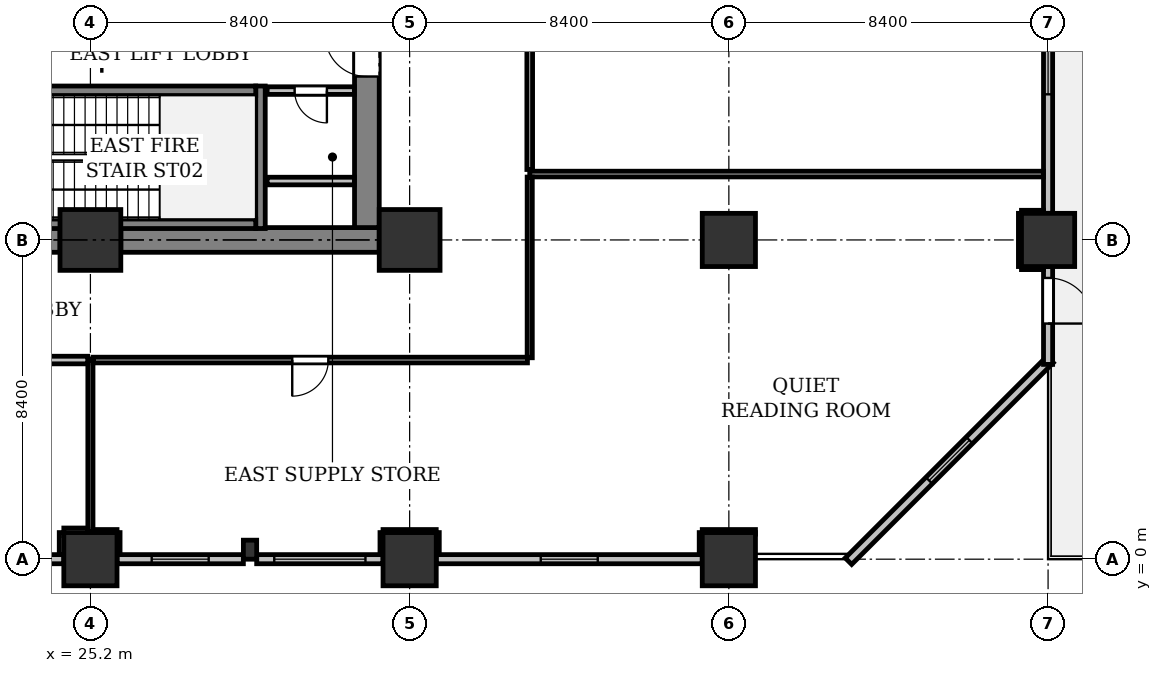
"""IFC4 building model, lengths in metres.
Left out: names, types, materials, properties, quantities, classifications, styles, units other than length and angle.
Written with IfcOpenShell. Run it as: python <this file> out.ifc"""

import sys

from ifc_helpers import new_model, si_unit, direction, frame, frame_2d, origin, origin_2d, place, context, subcontext, project, spatial, rectangle, extrude, element, fill, save


model = new_model("IFC4")
c1 = context("Model", 3, precision=1e-05, world=origin(), true_north=direction((0.0, 1.0)))
c2 = subcontext(c1, "Body", "Model", "MODEL_VIEW")
j1 = project(units=[si_unit("LENGTHUNIT", "METRE"), si_unit("PLANEANGLEUNIT", "RADIAN")], contexts=[c1])
p1 = place(None, origin())
s1 = spatial("IfcSite", under=j1, at=p1, CompositionType="ELEMENT")
p2 = place(p1, origin())
s2 = spatial("IfcBuilding", under=s1, at=p2, CompositionType="ELEMENT")
p3 = place(p2, frame((0.0, 0.0, 19.8)))
s3 = spatial("IfcBuildingStorey", under=s2, at=p3, CompositionType="ELEMENT", Elevation=19.8)
p4 = place(p3, frame((25.2, 0.0, 0.0), z_axis=(0.0, 0.0, 1.0), x_axis=(1.0, 0.0, 0.0)))
e1 = element("IfcColumn", 1, at=p4, inside=s3, PredefinedType="COLUMN", context=c2, shape_type="SweptSolid", body=[
    extrude(rectangle(XDim=1.4, YDim=1.4, at=origin_2d()), origin(), (0.0, 0.0, 1.0), 5.0),
])
p5 = place(p3, frame((25.2, 8.4, 0.0), z_axis=(0.0, 0.0, 1.0), x_axis=(1.0, 0.0, 0.0)))
e2 = element("IfcColumn", 2, at=p5, inside=s3, PredefinedType="COLUMN", context=c2, shape_type="SweptSolid", body=[
    extrude(rectangle(XDim=1.6, YDim=1.6, at=origin_2d()), origin(), (0.0, 0.0, 1.0), 5.0),
])
p6 = place(p3, frame((33.6, 0.0, 0.0), z_axis=(0.0, 0.0, 1.0), x_axis=(1.0, 0.0, 0.0)))
e3 = element("IfcColumn", 3, at=p6, inside=s3, PredefinedType="COLUMN", context=c2, shape_type="SweptSolid", body=[
    extrude(rectangle(XDim=1.4, YDim=1.4, at=origin_2d()), origin(), (0.0, 0.0, 1.0), 5.0),
])
p7 = place(p3, frame((33.6, 8.4, 0.0), z_axis=(0.0, 0.0, 1.0), x_axis=(1.0, 0.0, 0.0)))
e4 = element("IfcColumn", 4, at=p7, inside=s3, PredefinedType="COLUMN", context=c2, shape_type="SweptSolid", body=[
    extrude(rectangle(XDim=1.6, YDim=1.6, at=origin_2d()), origin(), (0.0, 0.0, 1.0), 5.0),
])
for number, where, z_axis, x_axis in (
    (5, (42.0, 0.0, 0.0), (0.0, 0.0, 1.0), (1.0, 0.0, 0.0)),
    (6, (42.0, 8.4, 0.0), (0.0, 0.0, 1.0), (1.0, 0.0, 0.0)),
    (7, (50.4, 8.4, 0.0), (0.0, 0.0, 1.0), (1.0, 0.0, 0.0)),
):
    element("IfcColumn", number, at=place(p3, frame(where, z_axis=z_axis, x_axis=x_axis)), inside=s3, PredefinedType="COLUMN", context=c2, shape_type="SweptSolid", body=[
        extrude(rectangle(XDim=1.4, YDim=1.4, at=origin_2d()), origin(), (0.0, 0.0, 1.0), 5.0),
    ])
p8 = place(p3, frame((29.4, 0.25, 0.0), z_axis=(0.0, 0.0, 1.0), x_axis=(1.0, 0.0, 0.0)))
e8 = element("IfcColumn", 8, at=p8, inside=s3, PredefinedType="PILASTER", context=c2, shape_type="SweptSolid", body=[
    extrude(rectangle(XDim=0.35, YDim=0.5, at=origin_2d()), origin(), (0.0, 0.0, 1.0), 5.0),
])
p9 = place(p3, frame((50.453, 5.253, 0.0), z_axis=(0.0, 0.0, 1.0), x_axis=(-0.707123050166, -0.707090511833, 0.0)))
e9 = element("IfcWall", 9, at=p9, inside=s3, PredefinedType="STANDARD", context=c2, shape_type="SweptSolid", body=[
    extrude(rectangle(XDim=7.503, YDim=0.24, at=frame_2d((3.751, 0.0))), origin(), (0.0, 0.0, 1.0), 4.725),
])
p10 = place(p9, frame((3.002, 0.0, 0.9)))
e10 = element("IfcOpeningElement", 10, at=p10, cuts=e9, PredefinedType="OPENING", context=c2, shape_type="SweptSolid", body=[
    extrude(rectangle(XDim=1.5, YDim=1.6, at=frame_2d((0.75, 0.8))), frame((0.0, 0.13, 0.0), z_axis=(0.0, -1.0, 0.0), x_axis=(1.0, 0.0, 0.0)), (0.0, 0.0, 1.0), 0.26),
])
p11 = place(p3, frame((41.3, 0.0, 0.0), z_axis=(0.0, 0.0, 1.0), x_axis=(-1.0, 0.0, 0.0)))
e11 = element("IfcWall", 11, at=p11, inside=s3, PredefinedType="STANDARD", context=c2, shape_type="SweptSolid", body=[
    extrude(rectangle(XDim=7.0, YDim=0.24, at=frame_2d((3.5, 0.0))), origin(), (0.0, 0.0, 1.0), 3.925),
])
p12 = place(p11, frame((2.75, 0.0, 0.9)))
e12 = element("IfcOpeningElement", 12, at=p12, cuts=e11, PredefinedType="OPENING", context=c2, shape_type="SweptSolid", body=[
    extrude(rectangle(XDim=1.5, YDim=1.6, at=frame_2d((0.75, 0.8))), frame((0.0, 0.13, 0.0), z_axis=(0.0, -1.0, 0.0), x_axis=(1.0, 0.0, 0.0)), (0.0, 0.0, 1.0), 0.26),
])
p13 = place(p3, frame((32.9, 0.0, 0.0), z_axis=(0.0, 0.0, 1.0), x_axis=(-1.0, 0.0, 0.0)))
e13 = element("IfcWall", 13, at=p13, inside=s3, PredefinedType="STANDARD", context=c2, shape_type="SweptSolid", body=[
    extrude(rectangle(XDim=3.325, YDim=0.24, at=frame_2d((1.663, 0.0))), origin(), (0.0, 0.0, 1.0), 3.925),
])
p14 = place(p13, frame((0.462, 0.0, 0.9)))
e14 = element("IfcOpeningElement", 14, at=p14, cuts=e13, PredefinedType="OPENING", context=c2, shape_type="SweptSolid", body=[
    extrude(rectangle(XDim=2.4, YDim=1.8, at=frame_2d((1.2, 0.9))), frame((0.0, 0.13, 0.0), z_axis=(0.0, -1.0, 0.0), x_axis=(1.0, 0.0, 0.0)), (0.0, 0.0, 1.0), 0.26),
])
p15 = place(p3, frame((29.225, 0.0, 0.0), z_axis=(0.0, 0.0, 1.0), x_axis=(-1.0, 0.0, 0.0)))
e15 = element("IfcWall", 15, at=p15, inside=s3, PredefinedType="STANDARD", context=c2, shape_type="SweptSolid", body=[
    extrude(rectangle(XDim=3.325, YDim=0.24, at=frame_2d((1.663, 0.0))), origin(), (0.0, 0.0, 1.0), 3.925),
])
p16 = place(p15, frame((0.913, 0.0, 0.9)))
e16 = element("IfcOpeningElement", 16, at=p16, cuts=e15, PredefinedType="OPENING", context=c2, shape_type="SweptSolid", body=[
    extrude(rectangle(XDim=1.5, YDim=1.6, at=frame_2d((0.75, 0.8))), frame((0.0, 0.13, 0.0), z_axis=(0.0, -1.0, 0.0), x_axis=(1.0, 0.0, 0.0)), (0.0, 0.0, 1.0), 0.26),
])
p17 = place(p3, frame((24.5, 0.0, 0.0), z_axis=(0.0, 0.0, 1.0), x_axis=(-1.0, 0.0, 0.0)))
e17 = element("IfcWall", 17, at=p17, inside=s3, PredefinedType="STANDARD", context=c2, shape_type="SweptSolid", body=[
    extrude(rectangle(XDim=3.325, YDim=0.24, at=frame_2d((1.663, 0.0))), origin(), (0.0, 0.0, 1.0), 3.925),
])
p18 = place(p17, frame((0.462, 0.0, 0.9)))
e18 = element("IfcOpeningElement", 18, at=p18, cuts=e17, PredefinedType="OPENING", context=c2, shape_type="SweptSolid", body=[
    extrude(rectangle(XDim=2.4, YDim=1.8, at=frame_2d((1.2, 0.9))), frame((0.0, 0.13, 0.0), z_axis=(0.0, -1.0, 0.0), x_axis=(1.0, 0.0, 0.0)), (0.0, 0.0, 1.0), 0.26),
])
p19 = place(p3, frame((50.4, 16.1, 0.0), z_axis=(0.0, 0.0, 1.0), x_axis=(0.0, -1.0, 0.0)))
e19 = element("IfcWall", 19, at=p19, inside=s3, PredefinedType="STANDARD", context=c2, shape_type="SweptSolid", body=[
    extrude(rectangle(XDim=7.0, YDim=0.24, at=frame_2d((3.5, 0.0))), origin(), (0.0, 0.0, 1.0), 4.113),
])
p20 = place(p19, frame((0.3, 0.0, 0.0)))
e20 = element("IfcOpeningElement", 20, at=p20, cuts=e19, PredefinedType="OPENING", context=c2, shape_type="SweptSolid", body=[
    extrude(rectangle(XDim=1.2, YDim=2.2, at=frame_2d((0.6, 1.1))), frame((0.0, 0.13, 0.0), z_axis=(0.0, -1.0, 0.0), x_axis=(1.0, 0.0, 0.0)), (0.0, 0.0, 1.0), 0.26),
])
p21 = place(p19, frame((2.068, 0.0, 0.9)))
e21 = element("IfcOpeningElement", 21, at=p21, cuts=e19, PredefinedType="OPENING", context=c2, shape_type="SweptSolid", body=[
    extrude(rectangle(XDim=1.8, YDim=1.6, at=frame_2d((0.9, 0.8))), frame((0.0, 0.13, 0.0), z_axis=(0.0, -1.0, 0.0), x_axis=(1.0, 0.0, 0.0)), (0.0, 0.0, 1.0), 0.26),
])
p22 = place(p3, frame((50.4, 7.7, 0.0), z_axis=(0.0, 0.0, 1.0), x_axis=(0.0, -1.0, 0.0)))
e22 = element("IfcWall", 22, at=p22, inside=s3, PredefinedType="STANDARD", context=c2, shape_type="SweptSolid", body=[
    extrude(rectangle(XDim=2.575, YDim=0.24, at=frame_2d((1.287, 0.0))), origin(), (0.0, 0.0, 1.0), 4.725),
])
p23 = place(p22, frame((0.3, 0.0, 0.0)))
e23 = element("IfcOpeningElement", 23, at=p23, cuts=e22, PredefinedType="OPENING", context=c2, shape_type="SweptSolid", body=[
    extrude(rectangle(XDim=1.2, YDim=2.2, at=frame_2d((0.6, 1.1))), frame((0.0, 0.13, 0.0), z_axis=(0.0, -1.0, 0.0), x_axis=(1.0, 0.0, 0.0)), (0.0, 0.0, 1.0), 0.26),
])
p24 = place(p3, frame((17.6, 8.4, 0.0), z_axis=(0.0, 0.0, 1.0), x_axis=(1.0, 0.0, 0.0)))
e24 = element("IfcWall", 24, at=p24, inside=s3, PredefinedType="SHEAR", context=c2, shape_type="SweptSolid", body=[
    extrude(rectangle(XDim=6.8, YDim=0.65, at=frame_2d((3.4, 0.0))), origin(), (0.0, 0.0, 1.0), 4.725),
])
p25 = place(p3, frame((26.0, 8.4, 0.0), z_axis=(0.0, 0.0, 1.0), x_axis=(1.0, 0.0, 0.0)))
e25 = element("IfcWall", 25, at=p25, inside=s3, PredefinedType="SHEAR", context=c2, shape_type="SweptSolid", body=[
    extrude(rectangle(XDim=6.8, YDim=0.65, at=frame_2d((3.4, 0.0))), origin(), (0.0, 0.0, 1.0), 4.725),
])
p26 = place(p3, frame((32.475, 8.725, 0.0), z_axis=(0.0, 0.0, 1.0), x_axis=(0.0, 1.0, 0.0)))
e26 = element("IfcWall", 26, at=p26, inside=s3, PredefinedType="SHEAR", context=c2, shape_type="SweptSolid", body=[
    extrude(rectangle(XDim=7.75, YDim=0.65, at=frame_2d((3.875, 0.0))), origin(), (0.0, 0.0, 1.0), 4.725),
])
p27 = place(p26, frame((3.975, 0.0, 0.0)))
e27 = element("IfcOpeningElement", 27, at=p27, cuts=e26, PredefinedType="OPENING", context=c2, shape_type="SweptSolid", body=[
    extrude(rectangle(XDim=1.1, YDim=2.15, at=frame_2d((0.55, 1.075))), frame((0.0, 0.335, 0.0), z_axis=(0.0, -1.0, 0.0), x_axis=(1.0, 0.0, 0.0)), (0.0, 0.0, 1.0), 0.67),
])
p28 = place(p3, frame((29.675, 8.7, 0.0), z_axis=(0.0, 0.0, 1.0), x_axis=(0.0, 1.0, 0.0)))
e28 = element("IfcWall", 28, at=p28, inside=s3, PredefinedType="SHEAR", context=c2, shape_type="SweptSolid", body=[
    extrude(rectangle(XDim=3.75, YDim=0.25, at=frame_2d((1.875, 0.0))), origin(), (0.0, 0.0, 1.0), 4.725),
])
p29 = place(p3, frame((21.8, 8.825, 0.0), z_axis=(0.0, 0.0, 1.0), x_axis=(1.0, 0.0, 0.0)))
e29 = element("IfcWall", 29, at=p29, inside=s3, PredefinedType="SHEAR", context=c2, shape_type="SweptSolid", body=[
    extrude(rectangle(XDim=7.75, YDim=0.25, at=frame_2d((3.875, 0.0))), origin(), (0.0, 0.0, 1.0), 4.725),
])
p30 = place(p3, frame((21.8, 12.325, 0.0), z_axis=(0.0, 0.0, 1.0), x_axis=(1.0, 0.0, 0.0)))
e30 = element("IfcWall", 30, at=p30, inside=s3, PredefinedType="SHEAR", context=c2, shape_type="SweptSolid", body=[
    extrude(rectangle(XDim=7.75, YDim=0.25, at=frame_2d((3.875, 0.0))), origin(), (0.0, 0.0, 1.0), 4.725),
])
p31 = place(p30, frame((0.22, 0.0, 0.0)))
e31 = element("IfcOpeningElement", 31, at=p31, cuts=e30, PredefinedType="OPENING", context=c2, shape_type="SweptSolid", body=[
    extrude(rectangle(XDim=1.1, YDim=2.15, at=frame_2d((0.55, 1.075))), frame((0.0, 0.135, 0.0), z_axis=(0.0, -1.0, 0.0), x_axis=(1.0, 0.0, 0.0)), (0.0, 0.0, 1.0), 0.27),
])
p32 = place(p3, frame((32.146, 12.33, 0.0), z_axis=(0.0, 0.0, 1.0), x_axis=(-1.0, 0.0, 0.0)))
e32 = element("IfcWall", 32, at=p32, inside=s3, PredefinedType="PARTITIONING", context=c2, shape_type="SweptSolid", body=[
    extrude(rectangle(XDim=2.296, YDim=0.2, at=frame_2d((1.148, 0.0))), origin(), (0.0, 0.0, 1.0), 4.725),
])
p33 = place(p32, frame((0.723, 0.0, 0.0)))
e33 = element("IfcOpeningElement", 33, at=p33, cuts=e32, PredefinedType="OPENING", context=c2, shape_type="SweptSolid", body=[
    extrude(rectangle(XDim=0.85, YDim=2.15, at=frame_2d((0.425, 1.075))), frame((0.0, 0.11, 0.0), z_axis=(0.0, -1.0, 0.0), x_axis=(1.0, 0.0, 0.0)), (0.0, 0.0, 1.0), 0.22),
])
p34 = place(p3, frame((29.85, 9.95, 0.0), z_axis=(0.0, 0.0, 1.0), x_axis=(1.0, 0.0, 0.0)))
e34 = element("IfcWall", 34, at=p34, inside=s3, PredefinedType="PARTITIONING", context=c2, shape_type="SweptSolid", body=[
    extrude(rectangle(XDim=2.296, YDim=0.2, at=frame_2d((1.148, 0.0))), origin(), (0.0, 0.0, 1.0), 4.725),
])
p35 = place(p3, frame((25.2, 5.24, 0.0), z_axis=(0.0, 0.0, 1.0), x_axis=(0.0, -1.0, 0.0)))
e35 = element("IfcWall", 35, at=p35, inside=s3, PredefinedType="PARTITIONING", context=c2, shape_type="SweptSolid", body=[
    extrude(rectangle(XDim=4.52, YDim=0.135, at=frame_2d((2.26, 0.0))), origin(), (0.0, 0.0, 1.0), 4.113),
])
p36 = place(p3, frame((25.271, 0.72, 0.0), z_axis=(0.0, 0.0, 1.0), x_axis=(1.0, 0.0, 0.0)))
e36 = element("IfcWall", 36, at=p36, inside=s3, PredefinedType="PARTITIONING", context=c2, shape_type="SweptSolid", body=[
    extrude(rectangle(XDim=0.628, YDim=0.12, at=frame_2d((0.314, 0.0))), origin(), (0.0, 0.0, 1.0), 4.113),
])
for number, where, z_axis, x_axis in (
    (37, (25.92, 0.7, 0.0), (0.0, 0.0, 1.0), (0.0, -1.0, 0.0)),
    (38, (32.88, 0.124, 0.0), (0.0, 0.0, 1.0), (0.0, 1.0, 0.0)),
):
    element("IfcWall", number, at=place(p3, frame(where, z_axis=z_axis, x_axis=x_axis)), inside=s3, PredefinedType="PARTITIONING", context=c2, shape_type="SweptSolid", body=[
        extrude(rectangle(XDim=0.576, YDim=0.12, at=frame_2d((0.288, 0.0))), origin(), (0.0, 0.0, 1.0), 4.725),
    ])
p37 = place(p3, frame((32.9, 0.72, 0.0), z_axis=(0.0, 0.0, 1.0), x_axis=(1.0, 0.0, 0.0)))
e39 = element("IfcWall", 39, at=p37, inside=s3, PredefinedType="PARTITIONING", context=c2, shape_type="SweptSolid", body=[
    extrude(rectangle(XDim=1.4, YDim=0.12, at=frame_2d((0.7, 0.0))), origin(), (0.0, 0.0, 1.0), 4.113),
])
for number, where, z_axis, x_axis in (
    (40, (34.32, 0.7, 0.0), (0.0, 0.0, 1.0), (0.0, -1.0, 0.0)),
    (41, (41.28, 0.124, 0.0), (0.0, 0.0, 1.0), (0.0, 1.0, 0.0)),
):
    element("IfcWall", number, at=place(p3, frame(where, z_axis=z_axis, x_axis=x_axis)), inside=s3, PredefinedType="PARTITIONING", context=c2, shape_type="SweptSolid", body=[
        extrude(rectangle(XDim=0.576, YDim=0.12, at=frame_2d((0.288, 0.0))), origin(), (0.0, 0.0, 1.0), 4.725),
    ])
p38 = place(p3, frame((41.3, 0.72, 0.0), z_axis=(0.0, 0.0, 1.0), x_axis=(1.0, 0.0, 0.0)))
e42 = element("IfcWall", 42, at=p38, inside=s3, PredefinedType="PARTITIONING", context=c2, shape_type="SweptSolid", body=[
    extrude(rectangle(XDim=1.4, YDim=0.12, at=frame_2d((0.7, 0.0))), origin(), (0.0, 0.0, 1.0), 4.113),
])
p39 = place(p3, frame((50.276, 7.68, 0.0), z_axis=(0.0, 0.0, 1.0), x_axis=(-1.0, 0.0, 0.0)))
e43 = element("IfcWall", 43, at=p39, inside=s3, PredefinedType="PARTITIONING", context=c2, shape_type="SweptSolid", body=[
    extrude(rectangle(XDim=0.576, YDim=0.12, at=frame_2d((0.288, 0.0))), origin(), (0.0, 0.0, 1.0), 4.725),
])
p40 = place(p3, frame((49.68, 7.7, 0.0), z_axis=(0.0, 0.0, 1.0), x_axis=(0.0, 1.0, 0.0)))
e44 = element("IfcWall", 44, at=p40, inside=s3, PredefinedType="PARTITIONING", context=c2, shape_type="SweptSolid", body=[
    extrude(rectangle(XDim=1.4, YDim=0.12, at=frame_2d((0.7, 0.0))), origin(), (0.0, 0.0, 1.0), 3.925),
])
p41 = place(p3, frame((49.7, 9.12, 0.0), z_axis=(0.0, 0.0, 1.0), x_axis=(1.0, 0.0, 0.0)))
e45 = element("IfcWall", 45, at=p41, inside=s3, PredefinedType="PARTITIONING", context=c2, shape_type="SweptSolid", body=[
    extrude(rectangle(XDim=0.576, YDim=0.12, at=frame_2d((0.288, 0.0))), origin(), (0.0, 0.0, 1.0), 4.725),
])
p42 = place(p3, frame((50.276, 10.134, 0.0), z_axis=(0.0, 0.0, 1.0), x_axis=(-1.0, 0.0, 0.0)))
e46 = element("IfcWall", 46, at=p42, inside=s3, PredefinedType="PARTITIONING", context=c2, shape_type="SweptSolid", body=[
    extrude(rectangle(XDim=13.516, YDim=0.15, at=frame_2d((6.758, 0.0))), origin(), (0.0, 0.0, 1.0), 4.113),
])
p43 = place(p3, frame((36.76, 10.055, 0.0), z_axis=(0.0, 0.0, 1.0), x_axis=(0.0, -1.0, 0.0)))
e47 = element("IfcWall", 47, at=p43, inside=s3, PredefinedType="PARTITIONING", context=c2, shape_type="SweptSolid", body=[
    extrude(rectangle(XDim=4.755, YDim=0.135, at=frame_2d((2.377, 0.0))), origin(), (0.0, 0.0, 1.0), 3.925),
])
p44 = place(p3, frame((36.7, 5.24, 0.0), z_axis=(0.0, 0.0, 1.0), x_axis=(-1.0, 0.0, 0.0)))
e48 = element("IfcWall", 48, at=p44, inside=s3, PredefinedType="PARTITIONING", context=c2, shape_type="SweptSolid", body=[
    extrude(rectangle(XDim=11.428, YDim=0.15, at=frame_2d((5.714, 0.0))), origin(), (0.0, 0.0, 1.0), 4.113),
])
p45 = place(p44, frame((5.239, 0.0, 0.0)))
e49 = element("IfcOpeningElement", 49, at=p45, cuts=e48, PredefinedType="OPENING", context=c2, shape_type="SweptSolid", body=[
    extrude(rectangle(XDim=0.95, YDim=2.15, at=frame_2d((0.475, 1.075))), frame((0.0, 0.085, 0.0), z_axis=(0.0, -1.0, 0.0), x_axis=(1.0, 0.0, 0.0)), (0.0, 0.0, 1.0), 0.17),
])
p46 = place(p3, frame((36.76, 17.546, 0.0), z_axis=(0.0, 0.0, 1.0), x_axis=(0.0, -1.0, 0.0)))
e50 = element("IfcWall", 50, at=p46, inside=s3, PredefinedType="PARTITIONING", context=c2, shape_type="SweptSolid", body=[
    extrude(rectangle(XDim=7.292, YDim=0.15, at=frame_2d((3.646, 0.0))), origin(), (0.0, 0.0, 1.0), 3.925),
])
p47 = place(p3, frame((24.48, 0.124, 0.0), z_axis=(0.0, 0.0, 1.0), x_axis=(0.0, 1.0, 0.0)))
e51 = element("IfcWall", 51, at=p47, inside=s3, PredefinedType="PARTITIONING", context=c2, shape_type="SweptSolid", body=[
    extrude(rectangle(XDim=0.576, YDim=0.2, at=frame_2d((0.288, 0.0))), origin(), (0.0, 0.0, 1.0), 3.925),
])
p48 = place(p3, frame((24.5, 0.72, 0.0), z_axis=(0.0, 0.0, 1.0), x_axis=(1.0, 0.0, 0.0)))
e52 = element("IfcWall", 52, at=p48, inside=s3, PredefinedType="PARTITIONING", context=c2, shape_type="SweptSolid", body=[
    extrude(rectangle(XDim=0.628, YDim=0.2, at=frame_2d((0.314, 0.0))), origin(), (0.0, 0.0, 1.0), 4.113),
])
p49 = place(p3, frame((25.128, 5.24, 0.0), z_axis=(0.0, 0.0, 1.0), x_axis=(-1.0, 0.0, 0.0)))
e53 = element("IfcWall", 53, at=p49, inside=s3, PredefinedType="PARTITIONING", context=c2, shape_type="SweptSolid", body=[
    extrude(rectangle(XDim=10.979, YDim=0.2, at=frame_2d((5.489, 0.0))), origin(), (0.0, 0.0, 1.0), 4.113),
])
p50 = place(p10, origin())
e54 = element("IfcWindow", 54, at=p50, inside=s3, PartitioningType="SINGLE_PANEL", PredefinedType="WINDOW", context=c2, shape_type="SweptSolid", body=[
    extrude(rectangle(XDim=1.5, YDim=1.6, at=frame_2d((0.75, 0.8))), frame((0.0, 0.03, 0.0), z_axis=(0.0, -1.0, 0.0), x_axis=(1.0, 0.0, 0.0)), (0.0, 0.0, 1.0), 0.06),
])
fill(e10, e54)
p51 = place(p12, origin())
e55 = element("IfcWindow", 55, at=p51, inside=s3, PartitioningType="SINGLE_PANEL", PredefinedType="WINDOW", context=c2, shape_type="SweptSolid", body=[
    extrude(rectangle(XDim=1.5, YDim=1.6, at=frame_2d((0.75, 0.8))), frame((0.0, 0.03, 0.0), z_axis=(0.0, -1.0, 0.0), x_axis=(1.0, 0.0, 0.0)), (0.0, 0.0, 1.0), 0.06),
])
fill(e12, e55)
p52 = place(p14, origin())
e56 = element("IfcWindow", 56, at=p52, inside=s3, PartitioningType="SINGLE_PANEL", PredefinedType="WINDOW", context=c2, shape_type="SweptSolid", body=[
    extrude(rectangle(XDim=2.4, YDim=1.8, at=frame_2d((1.2, 0.9))), frame((0.0, 0.03, 0.0), z_axis=(0.0, -1.0, 0.0), x_axis=(1.0, 0.0, 0.0)), (0.0, 0.0, 1.0), 0.06),
])
fill(e14, e56)
p53 = place(p16, origin())
e57 = element("IfcWindow", 57, at=p53, inside=s3, PartitioningType="SINGLE_PANEL", PredefinedType="WINDOW", context=c2, shape_type="SweptSolid", body=[
    extrude(rectangle(XDim=1.5, YDim=1.6, at=frame_2d((0.75, 0.8))), frame((0.0, 0.03, 0.0), z_axis=(0.0, -1.0, 0.0), x_axis=(1.0, 0.0, 0.0)), (0.0, 0.0, 1.0), 0.06),
])
fill(e16, e57)
p54 = place(p21, origin())
e58 = element("IfcWindow", 58, at=p54, inside=s3, PartitioningType="SINGLE_PANEL", PredefinedType="WINDOW", context=c2, shape_type="SweptSolid", body=[
    extrude(rectangle(XDim=1.8, YDim=1.6, at=frame_2d((0.9, 0.8))), frame((0.0, 0.03, 0.0), z_axis=(0.0, -1.0, 0.0), x_axis=(1.0, 0.0, 0.0)), (0.0, 0.0, 1.0), 0.06),
])
fill(e21, e58)
p55 = place(p23, origin())
e59 = element("IfcDoor", 59, at=p55, inside=s3, OperationType="SINGLE_SWING_RIGHT", PredefinedType="DOOR", context=c2, shape_type="SweptSolid", body=[
    extrude(rectangle(XDim=1.2, YDim=2.2, at=frame_2d((0.6, 1.1))), frame((0.0, 0.025, 0.0), z_axis=(0.0, -1.0, 0.0), x_axis=(1.0, 0.0, 0.0)), (0.0, 0.0, 1.0), 0.05),
])
fill(e23, e59)
p56 = place(p27, origin())
e60 = element("IfcDoor", 60, at=p56, inside=s3, OperationType="SINGLE_SWING_RIGHT", PredefinedType="DOOR", context=c2, shape_type="SweptSolid", body=[
    extrude(rectangle(XDim=1.1, YDim=2.15, at=frame_2d((0.55, 1.075))), frame((0.0, 0.025, 0.0), z_axis=(0.0, -1.0, 0.0), x_axis=(1.0, 0.0, 0.0)), (0.0, 0.0, 1.0), 0.05),
])
fill(e27, e60)
p57 = place(p33, origin())
e61 = element("IfcDoor", 61, at=p57, inside=s3, OperationType="SINGLE_SWING_LEFT", PredefinedType="DOOR", context=c2, shape_type="SweptSolid", body=[
    extrude(rectangle(XDim=0.85, YDim=2.15, at=frame_2d((0.425, 1.075))), frame((0.0, 0.025, 0.0), z_axis=(0.0, -1.0, 0.0), x_axis=(1.0, 0.0, 0.0)), (0.0, 0.0, 1.0), 0.05),
])
fill(e33, e61)
p58 = place(p45, origin())
e62 = element("IfcDoor", 62, at=p58, inside=s3, OperationType="SINGLE_SWING_RIGHT", PredefinedType="DOOR", context=c2, shape_type="SweptSolid", body=[
    extrude(rectangle(XDim=0.95, YDim=2.15, at=frame_2d((0.475, 1.075))), frame((0.0, 0.025, 0.0), z_axis=(0.0, -1.0, 0.0), x_axis=(1.0, 0.0, 0.0)), (0.0, 0.0, 1.0), 0.05),
])
fill(e49, e62)
save(model, sys.argv[1])
